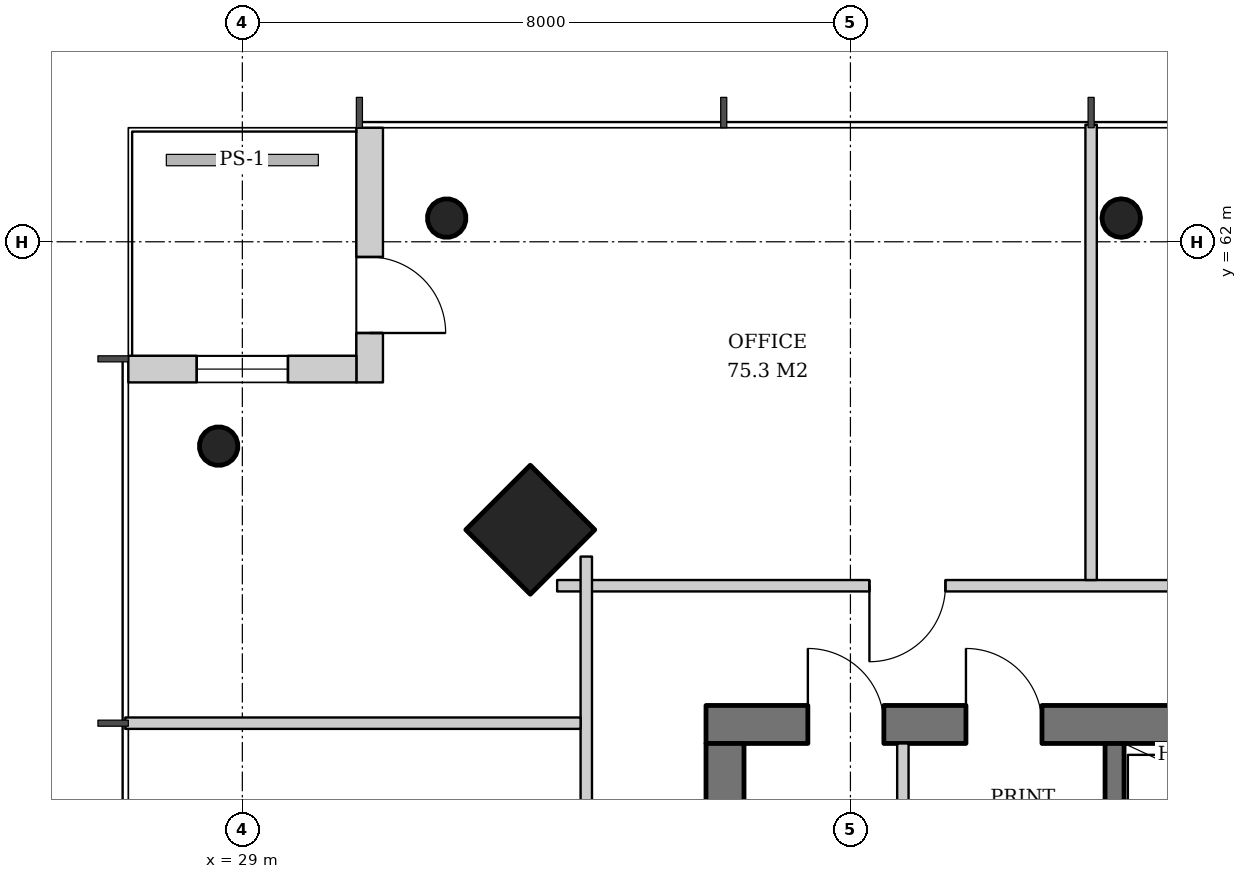
"""IFC4 building model, lengths in metres.
Left out: names, types, materials, properties, quantities, classifications, styles, units other than length and angle.
Written with IfcOpenShell. Run it as: python <this file> out.ifc"""

import sys

from ifc_helpers import new_model, si_unit, direction, frame, frame_2d, origin, origin_2d, place, context, subcontext, project, spatial, rectangle, hollow_circle, extrude, element, fill, save


model = new_model("IFC4")
c1 = context("Model", 3, precision=1e-05, world=origin(), true_north=direction((0.0, 1.0)))
c2 = subcontext(c1, "Body", "Model", "MODEL_VIEW")
j1 = project(units=[si_unit("LENGTHUNIT", "METRE"), si_unit("PLANEANGLEUNIT", "RADIAN")], contexts=[c1])
p1 = place(None, origin())
s1 = spatial("IfcSite", under=j1, at=p1, CompositionType="ELEMENT")
p2 = place(p1, origin())
s2 = spatial("IfcBuilding", under=s1, at=p2, CompositionType="ELEMENT")
p3 = place(p2, frame((0.0, 0.0, 260.4)))
s3 = spatial("IfcBuildingStorey", under=s2, at=p3, CompositionType="ELEMENT", Elevation=260.4)
p4 = place(p3, frame((32.75, 58.25, 0.0), z_axis=(0.031898107953, -0.031898107953, 0.998981992539), x_axis=(0.707106781187, 0.707106781187, 0.0)))
e1 = element("IfcColumn", 1, at=p4, inside=s3, PredefinedType="COLUMN", context=c2, shape_type="SweptSolid", body=[
    extrude(rectangle(XDim=1.2, YDim=1.2, at=origin_2d()), origin(), (0.0, 0.0, 1.0), 3.804),
])
p5 = place(p3, frame((31.65, 62.35, 0.0), z_axis=(0.031962158256, -0.031962158256, 0.998977898093), x_axis=(0.707106781187, 0.707106781187, 0.0)))
e2 = element("IfcColumn", 2, at=p5, inside=s3, PredefinedType="COLUMN", context=c2, shape_type="SweptSolid", body=[
    extrude(hollow_circle(Radius=0.254, WallThickness=0.02, at=origin_2d()), origin(), (0.0, 0.0, 1.0), 3.804),
])
p6 = place(p3, frame((40.55, 62.35, 0.0), z_axis=(0.010658893366, -0.031976680097, 0.999431778523), x_axis=(0.948683298051, 0.316227766017, 0.0)))
e3 = element("IfcColumn", 3, at=p6, inside=s3, PredefinedType="COLUMN", context=c2, shape_type="SweptSolid", body=[
    extrude(hollow_circle(Radius=0.254, WallThickness=0.02, at=origin_2d()), origin(), (0.0, 0.0, 1.0), 3.802),
])
p7 = place(p3, frame((28.65, 59.35, 0.0), z_axis=(0.031962158256, -0.031962158256, 0.998977898093), x_axis=(0.707106781187, 0.707106781187, 0.0)))
e4 = element("IfcColumn", 4, at=p7, inside=s3, PredefinedType="COLUMN", context=c2, shape_type="SweptSolid", body=[
    extrude(hollow_circle(Radius=0.254, WallThickness=0.02, at=origin_2d()), origin(), (0.0, 0.0, 1.0), 3.804),
])
p8 = place(p3, frame((35.1, 55.65, 0.0), z_axis=(0.0, 0.0, 1.0), x_axis=(1.0, 0.0, 0.0)))
e5 = element("IfcWall", 5, at=p8, inside=s3, PredefinedType="SHEAR", context=c2, shape_type="SweptSolid", body=[
    extrude(rectangle(XDim=19.8, YDim=0.5, at=frame_2d((9.9, 0.0))), origin(), (0.0, 0.0, 1.0), 3.8),
])
p9 = place(p8, frame((14.54, 0.0, 0.0)))
e6 = element("IfcOpeningElement", 6, at=p9, cuts=e5, PredefinedType="OPENING", context=c2, shape_type="SweptSolid", body=[
    extrude(rectangle(XDim=1.0, YDim=2.1, at=frame_2d((0.5, 1.05))), frame((0.0, 0.26, 0.0), z_axis=(0.0, -1.0, 0.0), x_axis=(1.0, 0.0, 0.0)), (0.0, 0.0, 1.0), 0.52),
])
p10 = place(p8, frame((1.34, 0.0, 0.0)))
e7 = element("IfcOpeningElement", 7, at=p10, cuts=e5, PredefinedType="OPENING", context=c2, shape_type="SweptSolid", body=[
    extrude(rectangle(XDim=1.0, YDim=2.1, at=frame_2d((0.5, 1.05))), frame((0.0, 0.26, 0.0), z_axis=(0.0, -1.0, 0.0), x_axis=(1.0, 0.0, 0.0)), (0.0, 0.0, 1.0), 0.52),
])
p11 = place(p8, frame((3.42, 0.0, 0.0)))
e8 = element("IfcOpeningElement", 8, at=p11, cuts=e5, PredefinedType="OPENING", context=c2, shape_type="SweptSolid", body=[
    extrude(rectangle(XDim=1.0, YDim=2.1, at=frame_2d((0.5, 1.05))), frame((0.0, 0.26, 0.0), z_axis=(0.0, -1.0, 0.0), x_axis=(1.0, 0.0, 0.0)), (0.0, 0.0, 1.0), 0.52),
])
p12 = place(p3, frame((35.35, 36.6, 0.0), z_axis=(0.0, 0.0, 1.0), x_axis=(0.0, 1.0, 0.0)))
e9 = element("IfcWall", 9, at=p12, inside=s3, PredefinedType="SHEAR", context=c2, shape_type="SweptSolid", body=[
    extrude(rectangle(XDim=18.8, YDim=0.5, at=frame_2d((9.4, 0.0))), origin(), (0.0, 0.0, 1.0), 3.8),
])
p13 = place(p12, frame((8.5, 0.0, 0.0)))
e10 = element("IfcOpeningElement", 10, at=p13, cuts=e9, PredefinedType="OPENING", context=c2, shape_type="SweptSolid", body=[
    extrude(rectangle(XDim=1.8, YDim=2.4, at=frame_2d((0.9, 1.2))), frame((0.0, 0.26, 0.0), z_axis=(0.0, -1.0, 0.0), x_axis=(1.0, 0.0, 0.0)), (0.0, 0.0, 1.0), 0.52),
])
p14 = place(p3, frame((30.675, 63.5, 0.0), z_axis=(0.0, 0.0, 1.0), x_axis=(0.0, -1.0, 0.0)))
e11 = element("IfcWall", 11, at=p14, inside=s3, PredefinedType="SOLIDWALL", context=c2, shape_type="SweptSolid", body=[
    extrude(rectangle(XDim=3.35, YDim=0.35, at=frame_2d((1.675, 0.0))), origin(), (0.0, 0.0, 1.0), 3.62),
])
p15 = place(p14, frame((1.7, 0.0, 0.0)))
e12 = element("IfcOpeningElement", 12, at=p15, cuts=e11, PredefinedType="OPENING", context=c2, shape_type="SweptSolid", body=[
    extrude(rectangle(XDim=1.0, YDim=2.4, at=frame_2d((0.5, 1.2))), frame((0.0, 0.185, 0.0), z_axis=(0.0, -1.0, 0.0), x_axis=(1.0, 0.0, 0.0)), (0.0, 0.0, 1.0), 0.37),
])
p16 = place(p3, frame((30.5, 60.325, 0.0), z_axis=(0.0, 0.0, 1.0), x_axis=(-1.0, 0.0, 0.0)))
e13 = element("IfcWall", 13, at=p16, inside=s3, PredefinedType="SOLIDWALL", context=c2, shape_type="SweptSolid", body=[
    extrude(rectangle(XDim=3.0, YDim=0.35, at=frame_2d((1.5, 0.0))), origin(), (0.0, 0.0, 1.0), 3.62),
])
p17 = place(p16, frame((0.9, 0.0, 0.6)))
e14 = element("IfcOpeningElement", 14, at=p17, cuts=e13, PredefinedType="OPENING", context=c2, shape_type="SweptSolid", body=[
    extrude(rectangle(XDim=1.2, YDim=2.55, at=frame_2d((0.6, 1.275))), frame((0.0, 0.185, 0.0), z_axis=(0.0, -1.0, 0.0), x_axis=(1.0, 0.0, 0.0)), (0.0, 0.0, 1.0), 0.37),
])
p18 = place(p3, frame((40.475, 52.4, 0.0), z_axis=(0.0, 0.0, 1.0), x_axis=(0.0, 1.0, 0.0)))
e15 = element("IfcWall", 15, at=p18, inside=s3, PredefinedType="SHEAR", context=c2, shape_type="SweptSolid", body=[
    extrude(rectangle(XDim=3.0, YDim=0.25, at=frame_2d((1.5, 0.0))), origin(), (0.0, 0.0, 1.0), 3.8),
])
p19 = place(p3, frame((37.69, 52.4, 0.0), z_axis=(0.0, 0.0, 1.0), x_axis=(0.0, 1.0, 0.0)))
e16 = element("IfcWall", 16, at=p19, inside=s3, PredefinedType="SOLIDWALL", context=c2, shape_type="SweptSolid", body=[
    extrude(rectangle(XDim=3.0, YDim=0.15, at=frame_2d((1.5, 0.0))), origin(), (0.0, 0.0, 1.0), 3.62),
])
p20 = place(p3, frame((56.859, 57.475, 0.0), z_axis=(0.0, 0.0, 1.0), x_axis=(-1.0, 0.0, 0.0)))
e17 = element("IfcWall", 17, at=p20, inside=s3, PredefinedType="PARTITIONING", context=c2, shape_type="SweptSolid", body=[
    extrude(rectangle(XDim=23.717, YDim=0.15, at=frame_2d((11.859, 0.0))), origin(), (0.0, 0.0, 1.0), 3.02),
])
p21 = place(p20, frame((4.109, 0.0, 0.0)))
e18 = element("IfcOpeningElement", 18, at=p21, cuts=e17, PredefinedType="OPENING", context=c2, shape_type="SweptSolid", body=[
    extrude(rectangle(XDim=1.0, YDim=2.1, at=frame_2d((0.5, 1.05))), frame((0.0, 0.085, 0.0), z_axis=(0.0, -1.0, 0.0), x_axis=(1.0, 0.0, 0.0)), (0.0, 0.0, 1.0), 0.17),
])
p22 = place(p20, frame((8.942, 0.0, 0.0)))
e19 = element("IfcOpeningElement", 19, at=p22, cuts=e17, PredefinedType="OPENING", context=c2, shape_type="SweptSolid", body=[
    extrude(rectangle(XDim=1.0, YDim=2.1, at=frame_2d((0.5, 1.05))), frame((0.0, 0.085, 0.0), z_axis=(0.0, -1.0, 0.0), x_axis=(1.0, 0.0, 0.0)), (0.0, 0.0, 1.0), 0.17),
])
p23 = place(p20, frame((18.609, 0.0, 0.0)))
e20 = element("IfcOpeningElement", 20, at=p23, cuts=e17, PredefinedType="OPENING", context=c2, shape_type="SweptSolid", body=[
    extrude(rectangle(XDim=1.0, YDim=2.1, at=frame_2d((0.5, 1.05))), frame((0.0, 0.085, 0.0), z_axis=(0.0, -1.0, 0.0), x_axis=(1.0, 0.0, 0.0)), (0.0, 0.0, 1.0), 0.17),
])
p24 = place(p3, frame((40.167, 57.55, 0.0), z_axis=(0.0, 0.0, 1.0), x_axis=(0.0, 1.0, 0.0)))
e21 = element("IfcWall", 21, at=p24, inside=s3, PredefinedType="PARTITIONING", context=c2, shape_type="SweptSolid", body=[
    extrude(rectangle(XDim=5.99, YDim=0.15, at=frame_2d((2.995, 0.0))), origin(), (0.0, 0.0, 1.0), 3.12),
])
p25 = place(p3, frame((33.525, 57.859, 0.0), z_axis=(0.0, 0.0, 1.0), x_axis=(0.0, -1.0, 0.0)))
e22 = element("IfcWall", 22, at=p25, inside=s3, PredefinedType="PARTITIONING", context=c2, shape_type="SweptSolid", body=[
    extrude(rectangle(XDim=23.717, YDim=0.15, at=frame_2d((11.859, 0.0))), origin(), (0.0, 0.0, 1.0), 3.02),
])
p26 = place(p25, frame((4.109, 0.0, 0.0)))
e23 = element("IfcOpeningElement", 23, at=p26, cuts=e22, PredefinedType="OPENING", context=c2, shape_type="SweptSolid", body=[
    extrude(rectangle(XDim=1.0, YDim=2.1, at=frame_2d((0.5, 1.05))), frame((0.0, 0.085, 0.0), z_axis=(0.0, -1.0, 0.0), x_axis=(1.0, 0.0, 0.0)), (0.0, 0.0, 1.0), 0.17),
])
p27 = place(p25, frame((9.042, 0.0, 0.0)))
e24 = element("IfcOpeningElement", 24, at=p27, cuts=e22, PredefinedType="OPENING", context=c2, shape_type="SweptSolid", body=[
    extrude(rectangle(XDim=0.8, YDim=2.1, at=frame_2d((0.4, 1.05))), frame((0.0, 0.085, 0.0), z_axis=(0.0, -1.0, 0.0), x_axis=(1.0, 0.0, 0.0)), (0.0, 0.0, 1.0), 0.17),
])
p28 = place(p25, frame((13.775, 0.0, 0.0)))
e25 = element("IfcOpeningElement", 25, at=p28, cuts=e22, PredefinedType="OPENING", context=c2, shape_type="SweptSolid", body=[
    extrude(rectangle(XDim=1.0, YDim=2.1, at=frame_2d((0.5, 1.05))), frame((0.0, 0.085, 0.0), z_axis=(0.0, -1.0, 0.0), x_axis=(1.0, 0.0, 0.0)), (0.0, 0.0, 1.0), 0.17),
])
p29 = place(p25, frame((18.708, 0.0, 0.0)))
e26 = element("IfcOpeningElement", 26, at=p29, cuts=e22, PredefinedType="OPENING", context=c2, shape_type="SweptSolid", body=[
    extrude(rectangle(XDim=0.8, YDim=2.1, at=frame_2d((0.4, 1.05))), frame((0.0, 0.085, 0.0), z_axis=(0.0, -1.0, 0.0), x_axis=(1.0, 0.0, 0.0)), (0.0, 0.0, 1.0), 0.17),
])
p30 = place(p3, frame((33.45, 55.667, 0.0), z_axis=(0.0, 0.0, 1.0), x_axis=(-1.0, 0.0, 0.0)))
e27 = element("IfcWall", 27, at=p30, inside=s3, PredefinedType="PARTITIONING", context=c2, shape_type="SweptSolid", body=[
    extrude(rectangle(XDim=5.99, YDim=0.15, at=frame_2d((2.995, 0.0))), origin(), (0.0, 0.0, 1.0), 3.02),
])
p31 = place(p15, origin())
e28 = element("IfcDoor", 28, at=p31, inside=s3, OperationType="SINGLE_SWING_RIGHT", PredefinedType="DOOR", context=c2, shape_type="SweptSolid", body=[
    extrude(rectangle(XDim=1.0, YDim=2.4, at=frame_2d((0.5, 1.2))), frame((0.0, 0.025, 0.0), z_axis=(0.0, -1.0, 0.0), x_axis=(1.0, 0.0, 0.0)), (0.0, 0.0, 1.0), 0.05),
])
fill(e12, e28)
p32 = place(p17, origin())
e29 = element("IfcWindow", 29, at=p32, inside=s3, PartitioningType="SINGLE_PANEL", PredefinedType="WINDOW", context=c2, shape_type="SweptSolid", body=[
    extrude(rectangle(XDim=1.2, YDim=2.55, at=frame_2d((0.6, 1.275))), frame((0.0, 0.03, 0.0), z_axis=(0.0, -1.0, 0.0), x_axis=(1.0, 0.0, 0.0)), (0.0, 0.0, 1.0), 0.06),
])
fill(e14, e29)
p33 = place(p10, origin())
e30 = element("IfcDoor", 30, at=p33, inside=s3, OperationType="SINGLE_SWING_LEFT", PredefinedType="DOOR", context=c2, shape_type="SweptSolid", body=[
    extrude(rectangle(XDim=1.0, YDim=2.1, at=frame_2d((0.5, 1.05))), frame((0.0, -0.19, 0.0), z_axis=(0.0, -1.0, 0.0), x_axis=(1.0, 0.0, 0.0)), (0.0, 0.0, 1.0), 0.05),
])
fill(e7, e30)
p34 = place(p11, origin())
e31 = element("IfcDoor", 31, at=p34, inside=s3, OperationType="SINGLE_SWING_LEFT", PredefinedType="DOOR", context=c2, shape_type="SweptSolid", body=[
    extrude(rectangle(XDim=1.0, YDim=2.1, at=frame_2d((0.5, 1.05))), frame((0.0, -0.19, 0.0), z_axis=(0.0, -1.0, 0.0), x_axis=(1.0, 0.0, 0.0)), (0.0, 0.0, 1.0), 0.05),
])
fill(e8, e31)
p35 = place(p23, origin())
e32 = element("IfcDoor", 32, at=p35, inside=s3, OperationType="SINGLE_SWING_RIGHT", PredefinedType="DOOR", context=c2, shape_type="SweptSolid", body=[
    extrude(rectangle(XDim=1.0, YDim=2.1, at=frame_2d((0.5, 1.05))), frame((0.0, 0.025, 0.0), z_axis=(0.0, -1.0, 0.0), x_axis=(1.0, 0.0, 0.0)), (0.0, 0.0, 1.0), 0.05),
])
fill(e20, e32)
save(model, sys.argv[1])
